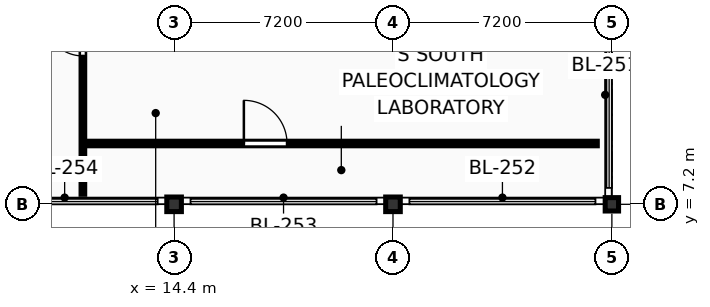
"""IFC4 building model, lengths in metres.
Left out: names, types, materials, properties, quantities, classifications, styles, units other than length and angle.
Written with IfcOpenShell. Run it as: python <this file> out.ifc"""

import sys

from ifc_helpers import new_model, si_unit, direction, frame, frame_2d, origin, origin_2d, place, context, subcontext, project, spatial, rectangle, extrude, element, fill, save


model = new_model("IFC4")
c1 = context("Model", 3, precision=1e-05, world=origin(), true_north=direction((0.0, 1.0)))
c2 = subcontext(c1, "Body", "Model", "MODEL_VIEW")
j1 = project(units=[si_unit("LENGTHUNIT", "METRE"), si_unit("PLANEANGLEUNIT", "RADIAN")], contexts=[c1])
p1 = place(None, origin())
s1 = spatial("IfcSite", under=j1, at=p1, CompositionType="ELEMENT")
p2 = place(p1, origin())
s2 = spatial("IfcBuilding", under=s1, at=p2, CompositionType="ELEMENT")
p3 = place(p2, frame((0.0, 0.0, 22.95)))
s3 = spatial("IfcBuildingStorey", under=s2, at=p3, CompositionType="ELEMENT", Elevation=22.95)
for number, where, z_axis, x_axis in (
    (1, (14.4, 7.2, 0.0), (0.0, 0.0, 1.0), (1.0, 0.0, 0.0)),
    (2, (21.6, 7.2, 0.0), (0.0, 0.0, 1.0), (1.0, 0.0, 0.0)),
):
    element("IfcColumn", number, at=place(p3, frame(where, z_axis=z_axis, x_axis=x_axis)), inside=s3, PredefinedType="COLUMN", context=c2, shape_type="SweptSolid", body=[
        extrude(rectangle(XDim=0.48, YDim=0.48, at=origin_2d()), origin(), (0.0, 0.0, 1.0), 3.3),
    ])
p4 = place(p3, frame((28.8, 7.2, 0.0), z_axis=(0.0, 0.0, 1.0), x_axis=(1.0, 0.0, 0.0)))
e3 = element("IfcColumn", 3, at=p4, inside=s3, PredefinedType="COLUMN", context=c2, shape_type="SweptSolid", body=[
    extrude(rectangle(XDim=0.44, YDim=0.44, at=origin_2d()), origin(), (0.0, 0.0, 1.0), 3.3),
])
p5 = place(p3, frame((11.4, 7.53, 0.0), z_axis=(0.0, 0.0, 1.0), x_axis=(0.0, 1.0, 0.0)))
e4 = element("IfcWall", 4, at=p5, inside=s3, PredefinedType="PARTITIONING", context=c2, shape_type="SweptSolid", body=[
    extrude(rectangle(XDim=6.59, YDim=0.12, at=frame_2d((3.295, 0.0))), origin(), (0.0, 0.0, 1.0), 3.075),
])
p6 = place(p5, frame((4.55, 0.0, 0.0)))
e5 = element("IfcOpeningElement", 5, at=p6, cuts=e4, PredefinedType="OPENING", context=c2, shape_type="SweptSolid", body=[
    extrude(rectangle(XDim=1.26, YDim=2.18, at=frame_2d((0.63, 1.09))), frame((0.0, 0.072, 0.0), z_axis=(0.0, -1.0, 0.0), x_axis=(1.0, 0.0, 0.0)), (0.0, 0.0, 1.0), 0.144),
])
p7 = place(p3, frame((11.5, 9.2, 0.0), z_axis=(0.0, 0.0, 1.0), x_axis=(1.0, 0.0, 0.0)))
e6 = element("IfcWall", 6, at=p7, inside=s3, PredefinedType="PARTITIONING", context=c2, shape_type="SweptSolid", body=[
    extrude(rectangle(XDim=16.82, YDim=0.15, at=frame_2d((8.41, 0.0))), origin(), (0.0, 0.0, 1.0), 3.075),
])
p8 = place(p7, frame((5.195, 0.0, 0.0)))
e7 = element("IfcOpeningElement", 7, at=p8, cuts=e6, PredefinedType="OPENING", context=c2, shape_type="SweptSolid", body=[
    extrude(rectangle(XDim=1.42, YDim=2.22, at=frame_2d((0.71, 1.11))), frame((0.0, 0.087, 0.0), z_axis=(0.0, -1.0, 0.0), x_axis=(1.0, 0.0, 0.0)), (0.0, 0.0, 1.0), 0.174),
])
p9 = place(p6, origin())
e8 = element("IfcDoor", 8, at=p9, inside=s3, OperationType="SINGLE_SWING_RIGHT", PredefinedType="DOOR", context=c2, shape_type="SweptSolid", body=[
    extrude(rectangle(XDim=1.26, YDim=2.18, at=frame_2d((0.63, 1.09))), frame((0.0, 0.025, 0.0), z_axis=(0.0, -1.0, 0.0), x_axis=(1.0, 0.0, 0.0)), (0.0, 0.0, 1.0), 0.05),
])
fill(e5, e8)
p10 = place(p8, origin())
e9 = element("IfcDoor", 9, at=p10, inside=s3, OperationType="SINGLE_SWING_LEFT", PredefinedType="DOOR", context=c2, shape_type="SweptSolid", body=[
    extrude(rectangle(XDim=1.42, YDim=2.22, at=frame_2d((0.71, 1.11))), frame((0.0, 0.025, 0.0), z_axis=(0.0, -1.0, 0.0), x_axis=(1.0, 0.0, 0.0)), (0.0, 0.0, 1.0), 0.05),
])
fill(e7, e9)
save(model, sys.argv[1])
